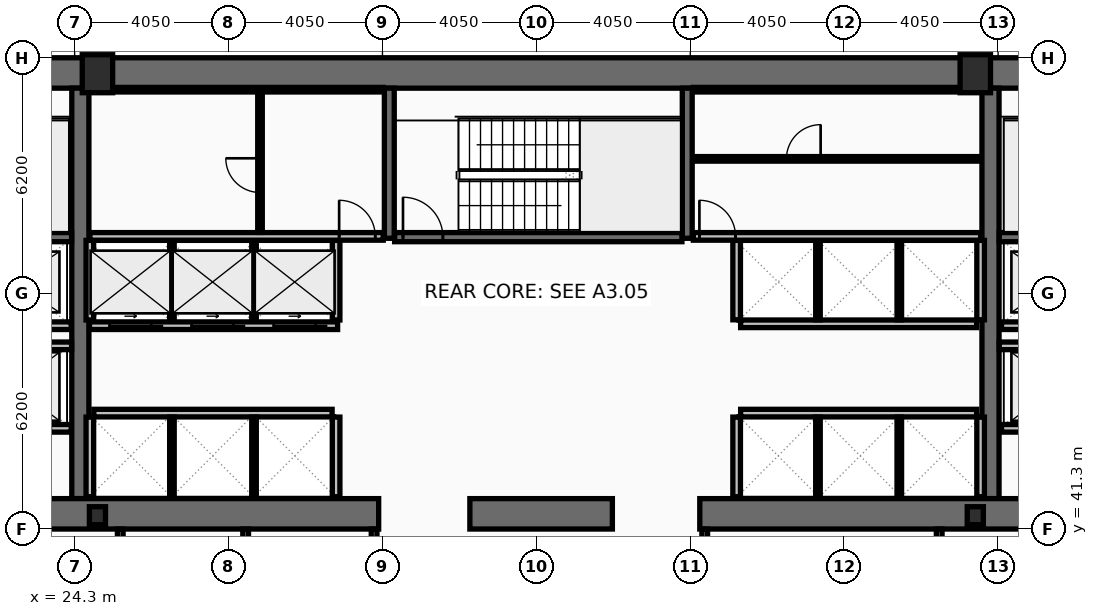
"""IFC4 building model, lengths in metres.
Left out: names, types, materials, properties, quantities, classifications, styles, units other than length and angle.
Written with IfcOpenShell. Run it as: python <this file> out.ifc"""

import sys

from ifc_helpers import new_model, si_unit, direction, frame, frame_2d, origin, origin_2d, place, context, subcontext, project, spatial, rectangle, hollow_rectangle, i_section, extrude, element, fill, save


model = new_model("IFC4")
c1 = context("Model", 3, precision=1e-05, world=origin(), true_north=direction((0.0, 1.0)))
c2 = subcontext(c1, "Body", "Model", "MODEL_VIEW")
j1 = project(units=[si_unit("LENGTHUNIT", "METRE"), si_unit("PLANEANGLEUNIT", "RADIAN")], contexts=[c1])
p1 = place(None, origin())
s1 = spatial("IfcSite", under=j1, at=p1, CompositionType="ELEMENT")
p2 = place(p1, origin())
s2 = spatial("IfcBuilding", under=s1, at=p2, CompositionType="ELEMENT")
p3 = place(p2, frame((0.0, 0.0, 53.8)))
s3 = spatial("IfcBuildingStorey", under=s2, at=p3, CompositionType="ELEMENT", Elevation=53.8)
p4 = place(p3, frame((16.2, 53.3, 0.0), z_axis=(0.0, 0.0, 1.0), x_axis=(1.0, 0.0, 0.0)))
e1 = element("IfcWall", 1, at=p4, inside=s3, PredefinedType="SHEAR", context=c2, shape_type="SweptSolid", body=[
    extrude(rectangle(XDim=40.5, YDim=0.8, at=frame_2d((20.25, 0.0))), origin(), (0.0, 0.0, 1.0), 3.82),
])
for number, where, z_axis, x_axis in (
    (2, (24.45, 42.1, 0.0), (0.0, 0.0, 1.0), (0.0, 1.0, 0.0)),
    (3, (48.4, 42.1, 0.0), (0.0, 0.0, 1.0), (0.0, 1.0, 0.0)),
):
    element("IfcWall", number, at=place(p3, frame(where, z_axis=z_axis, x_axis=x_axis)), inside=s3, PredefinedType="SHEAR", context=c2, shape_type="SweptSolid", body=[
        extrude(rectangle(XDim=10.8, YDim=0.45, at=frame_2d((5.4, 0.0))), origin(), (0.0, 0.0, 1.0), 3.82),
    ])
p5 = place(p3, frame((32.3, 41.7, 0.0), z_axis=(0.0, 0.0, 1.0), x_axis=(-1.0, 0.0, 0.0)))
e4 = element("IfcWall", 4, at=p5, inside=s3, PredefinedType="SHEAR", context=c2, shape_type="SweptSolid", body=[
    extrude(rectangle(XDim=11.45, YDim=0.8, at=frame_2d((5.725, 0.0))), origin(), (0.0, 0.0, 1.0), 3.82),
])
p6 = place(p3, frame((38.45, 41.7, 0.0), z_axis=(0.0, 0.0, 1.0), x_axis=(-1.0, 0.0, 0.0)))
e5 = element("IfcWall", 5, at=p6, inside=s3, PredefinedType="SHEAR", context=c2, shape_type="SweptSolid", body=[
    extrude(rectangle(XDim=3.75, YDim=0.8, at=frame_2d((1.875, 0.0))), origin(), (0.0, 0.0, 1.0), 3.82),
])
p7 = place(p3, frame((52.05, 41.7, 0.0), z_axis=(0.0, 0.0, 1.0), x_axis=(-1.0, 0.0, 0.0)))
e6 = element("IfcWall", 6, at=p7, inside=s3, PredefinedType="SHEAR", context=c2, shape_type="SweptSolid", body=[
    extrude(rectangle(XDim=11.3, YDim=0.8, at=frame_2d((5.65, 0.0))), origin(), (0.0, 0.0, 1.0), 3.82),
])
for number, where, z_axis, x_axis in (
    (7, (32.58, 48.95, 0.0), (0.0, 0.0, 1.0), (0.0, 1.0, 0.0)),
    (8, (40.42, 48.95, 0.0), (0.0, 0.0, 1.0), (0.0, 1.0, 0.0)),
):
    element("IfcWall", number, at=place(p3, frame(where, z_axis=z_axis, x_axis=x_axis)), inside=s3, PredefinedType="SHEAR", context=c2, shape_type="SweptSolid", body=[
        extrude(rectangle(XDim=3.95, YDim=0.26, at=frame_2d((1.975, 0.0))), origin(), (0.0, 0.0, 1.0), 3.82),
    ])
p8 = place(p3, frame((17.0, 48.98, 0.0), z_axis=(0.0, 0.0, 1.0), x_axis=(1.0, 0.0, 0.0)))
e9 = element("IfcWall", 9, at=p8, inside=s3, PredefinedType="SHEAR", context=c2, shape_type="SweptSolid", body=[
    extrude(rectangle(XDim=7.22, YDim=0.24, at=frame_2d((3.61, 0.0))), origin(), (0.0, 0.0, 1.0), 3.82),
])
p9 = place(p8, frame((0.22, 0.0, 0.0)))
e10 = element("IfcOpeningElement", 10, at=p9, cuts=e9, PredefinedType="OPENING", context=c2, shape_type="SweptSolid", body=[
    extrude(rectangle(XDim=1.05, YDim=2.15, at=frame_2d((0.525, 1.075))), frame((0.0, 0.13, 0.0), z_axis=(0.0, -1.0, 0.0), x_axis=(1.0, 0.0, 0.0)), (0.0, 0.0, 1.0), 0.26),
])
p10 = place(p3, frame((48.63, 48.98, 0.0), z_axis=(0.0, 0.0, 1.0), x_axis=(1.0, 0.0, 0.0)))
e11 = element("IfcWall", 11, at=p10, inside=s3, PredefinedType="SHEAR", context=c2, shape_type="SweptSolid", body=[
    extrude(rectangle(XDim=7.27, YDim=0.24, at=frame_2d((3.635, 0.0))), origin(), (0.0, 0.0, 1.0), 3.82),
])
p11 = place(p10, frame((6.0, 0.0, 0.0)))
e12 = element("IfcOpeningElement", 12, at=p11, cuts=e11, PredefinedType="OPENING", context=c2, shape_type="SweptSolid", body=[
    extrude(rectangle(XDim=1.05, YDim=2.15, at=frame_2d((0.525, 1.075))), frame((0.0, 0.13, 0.0), z_axis=(0.0, -1.0, 0.0), x_axis=(1.0, 0.0, 0.0)), (0.0, 0.0, 1.0), 0.26),
])
p12 = place(p3, frame((32.72, 48.98, 0.0), z_axis=(0.0, 0.0, 1.0), x_axis=(1.0, 0.0, 0.0)))
e13 = element("IfcWall", 13, at=p12, inside=s3, PredefinedType="SHEAR", context=c2, shape_type="SweptSolid", body=[
    extrude(rectangle(XDim=7.56, YDim=0.24, at=frame_2d((3.78, 0.0))), origin(), (0.0, 0.0, 1.0), 3.82),
])
p13 = place(p12, frame((0.22, 0.0, 0.0)))
e14 = element("IfcOpeningElement", 14, at=p13, cuts=e13, PredefinedType="OPENING", context=c2, shape_type="SweptSolid", body=[
    extrude(rectangle(XDim=1.05, YDim=2.15, at=frame_2d((0.525, 1.075))), frame((0.0, 0.13, 0.0), z_axis=(0.0, -1.0, 0.0), x_axis=(1.0, 0.0, 0.0)), (0.0, 0.0, 1.0), 0.26),
])
for number, where, z_axis, x_axis in (
    (15, (24.9, 53.28, 0.0), (0.0, 0.0, 1.0), (1.0, 0.0, 0.0)),
    (16, (48.0, 53.28, 0.0), (0.0, 0.0, 1.0), (1.0, 0.0, 0.0)),
):
    element("IfcColumn", number, at=place(p3, frame(where, z_axis=z_axis, x_axis=x_axis)), inside=s3, PredefinedType="COLUMN", context=c2, shape_type="SweptSolid", body=[
        extrude(hollow_rectangle(XDim=0.8, YDim=1.0, WallThickness=0.055, at=origin_2d()), origin(), (0.0, 0.0, 1.0), 4.0),
    ])
for number, where, z_axis, x_axis in (
    (17, (24.9, 41.65, 0.0), (0.0, 0.0, 1.0), (1.0, 0.0, 0.0)),
    (18, (48.0, 41.65, 0.0), (0.0, 0.0, 1.0), (1.0, 0.0, 0.0)),
):
    element("IfcColumn", number, at=place(p3, frame(where, z_axis=z_axis, x_axis=x_axis)), inside=s3, PredefinedType="COLUMN", context=c2, shape_type="SweptSolid", body=[
        extrude(i_section(OverallWidth=0.424, OverallDepth=0.474, WebThickness=0.048, FlangeThickness=0.077, at=origin_2d()), origin(), (0.0, 0.0, 1.0), 4.0),
    ])
p14 = place(p3, frame((51.61, 43.95, 0.0), z_axis=(0.0, 0.0, 1.0), x_axis=(-1.0, 0.0, 0.0)))
e19 = element("IfcWall", 19, at=p14, inside=s3, PredefinedType="PARTITIONING", context=c2, shape_type="SweptSolid", body=[
    extrude(rectangle(XDim=2.92, YDim=0.2, at=frame_2d((1.46, 0.0))), origin(), (0.0, 0.0, 1.0), 3.82),
])
p15 = place(p14, frame((0.81, 0.0, 0.0)))
e20 = element("IfcOpeningElement", 20, at=p15, cuts=e19, PredefinedType="OPENING", context=c2, shape_type="SweptSolid", body=[
    extrude(rectangle(XDim=1.3, YDim=2.18, at=frame_2d((0.65, 1.09))), frame((0.0, 0.11, 0.0), z_axis=(0.0, -1.0, 0.0), x_axis=(1.0, 0.0, 0.0)), (0.0, 0.0, 1.0), 0.22),
])
p16 = place(p3, frame((24.21, 43.95, 0.0), z_axis=(0.0, 0.0, 1.0), x_axis=(-1.0, 0.0, 0.0)))
e21 = element("IfcWall", 21, at=p16, inside=s3, PredefinedType="PARTITIONING", context=c2, shape_type="SweptSolid", body=[
    extrude(rectangle(XDim=2.97, YDim=0.2, at=frame_2d((1.485, 0.0))), origin(), (0.0, 0.0, 1.0), 3.82),
])
p17 = place(p16, frame((0.86, 0.0, 0.0)))
e22 = element("IfcOpeningElement", 22, at=p17, cuts=e21, PredefinedType="OPENING", context=c2, shape_type="SweptSolid", body=[
    extrude(rectangle(XDim=1.3, YDim=2.18, at=frame_2d((0.65, 1.09))), frame((0.0, 0.11, 0.0), z_axis=(0.0, -1.0, 0.0), x_axis=(1.0, 0.0, 0.0)), (0.0, 0.0, 1.0), 0.22),
])
p18 = place(p3, frame((51.61, 46.65, 0.0), z_axis=(0.0, 0.0, 1.0), x_axis=(-1.0, 0.0, 0.0)))
e23 = element("IfcWall", 23, at=p18, inside=s3, PredefinedType="PARTITIONING", context=c2, shape_type="SweptSolid", body=[
    extrude(rectangle(XDim=2.92, YDim=0.2, at=frame_2d((1.46, 0.0))), origin(), (0.0, 0.0, 1.0), 3.82),
])
p19 = place(p18, frame((0.86, 0.0, 0.0)))
e24 = element("IfcOpeningElement", 24, at=p19, cuts=e23, PredefinedType="OPENING", context=c2, shape_type="SweptSolid", body=[
    extrude(rectangle(XDim=1.2, YDim=2.18, at=frame_2d((0.6, 1.09))), frame((0.0, 0.11, 0.0), z_axis=(0.0, -1.0, 0.0), x_axis=(1.0, 0.0, 0.0)), (0.0, 0.0, 1.0), 0.22),
])
p20 = place(p3, frame((24.21, 46.65, 0.0), z_axis=(0.0, 0.0, 1.0), x_axis=(-1.0, 0.0, 0.0)))
e25 = element("IfcWall", 25, at=p20, inside=s3, PredefinedType="PARTITIONING", context=c2, shape_type="SweptSolid", body=[
    extrude(rectangle(XDim=2.97, YDim=0.2, at=frame_2d((1.485, 0.0))), origin(), (0.0, 0.0, 1.0), 3.82),
])
p21 = place(p20, frame((0.91, 0.0, 0.0)))
e26 = element("IfcOpeningElement", 26, at=p21, cuts=e25, PredefinedType="OPENING", context=c2, shape_type="SweptSolid", body=[
    extrude(rectangle(XDim=1.2, YDim=2.18, at=frame_2d((0.6, 1.09))), frame((0.0, 0.11, 0.0), z_axis=(0.0, -1.0, 0.0), x_axis=(1.0, 0.0, 0.0)), (0.0, 0.0, 1.0), 0.22),
])
p22 = place(p3, frame((31.22, 46.65, 0.0), z_axis=(0.0, 0.0, 1.0), x_axis=(-1.0, 0.0, 0.0)))
e27 = element("IfcWall", 27, at=p22, inside=s3, PredefinedType="PARTITIONING", context=c2, shape_type="SweptSolid", body=[
    extrude(rectangle(XDim=6.53, YDim=0.2, at=frame_2d((3.265, 0.0))), origin(), (0.0, 0.0, 1.0), 3.82),
])
p23 = place(p22, frame((4.9, 0.0, 0.0)))
e28 = element("IfcOpeningElement", 28, at=p23, cuts=e27, PredefinedType="OPENING", context=c2, shape_type="SweptSolid", body=[
    extrude(rectangle(XDim=1.1, YDim=2.18, at=frame_2d((0.55, 1.09))), frame((0.0, 0.11, 0.0), z_axis=(0.0, -1.0, 0.0), x_axis=(1.0, 0.0, 0.0)), (0.0, 0.0, 1.0), 0.22),
])
p24 = place(p22, frame((2.74, 0.0, 0.0)))
e29 = element("IfcOpeningElement", 29, at=p24, cuts=e27, PredefinedType="OPENING", context=c2, shape_type="SweptSolid", body=[
    extrude(rectangle(XDim=1.1, YDim=2.18, at=frame_2d((0.55, 1.09))), frame((0.0, 0.11, 0.0), z_axis=(0.0, -1.0, 0.0), x_axis=(1.0, 0.0, 0.0)), (0.0, 0.0, 1.0), 0.22),
])
p25 = place(p22, frame((0.58, 0.0, 0.0)))
e30 = element("IfcOpeningElement", 30, at=p25, cuts=e27, PredefinedType="OPENING", context=c2, shape_type="SweptSolid", body=[
    extrude(rectangle(XDim=1.1, YDim=2.18, at=frame_2d((0.55, 1.09))), frame((0.0, 0.11, 0.0), z_axis=(0.0, -1.0, 0.0), x_axis=(1.0, 0.0, 0.0)), (0.0, 0.0, 1.0), 0.22),
])
p26 = place(p3, frame((21.2, 46.12, 0.0), z_axis=(0.0, 0.0, 1.0), x_axis=(1.0, 0.0, 0.0)))
e31 = element("IfcWall", 31, at=p26, inside=s3, PredefinedType="PARTITIONING", context=c2, shape_type="SweptSolid", body=[
    extrude(rectangle(XDim=3.02, YDim=0.2, at=frame_2d((1.51, 0.0))), origin(), (0.0, 0.0, 1.0), 3.82),
])
p27 = place(p3, frame((48.63, 46.12, 0.0), z_axis=(0.0, 0.0, 1.0), x_axis=(1.0, 0.0, 0.0)))
e32 = element("IfcWall", 32, at=p27, inside=s3, PredefinedType="PARTITIONING", context=c2, shape_type="SweptSolid", body=[
    extrude(rectangle(XDim=3.07, YDim=0.2, at=frame_2d((1.535, 0.0))), origin(), (0.0, 0.0, 1.0), 3.82),
])
for number, where, z_axis, x_axis in (
    (33, (24.7, 46.8, 0.0), (0.0, 0.0, 1.0), (0.0, 1.0, 0.0)),
    (34, (31.18, 46.8, 0.0), (0.0, 0.0, 1.0), (0.0, 1.0, 0.0)),
):
    element("IfcWall", number, at=place(p3, frame(where, z_axis=z_axis, x_axis=x_axis)), inside=s3, PredefinedType="PARTITIONING", context=c2, shape_type="SweptSolid", body=[
        extrude(rectangle(XDim=2.095, YDim=0.2, at=frame_2d((1.047, 0.0))), origin(), (0.0, 0.0, 1.0), 3.82),
    ])
for number, where, z_axis, x_axis in (
    (35, (26.86, 46.8, 0.0), (0.0, 0.0, 1.0), (0.0, 1.0, 0.0)),
    (36, (29.02, 46.8, 0.0), (0.0, 0.0, 1.0), (0.0, 1.0, 0.0)),
):
    element("IfcWall", number, at=place(p3, frame(where, z_axis=z_axis, x_axis=x_axis)), inside=s3, PredefinedType="PARTITIONING", context=c2, shape_type="SweptSolid", body=[
        extrude(rectangle(XDim=2.095, YDim=0.12, at=frame_2d((1.047, 0.0))), origin(), (0.0, 0.0, 1.0), 3.82),
    ])
p28 = place(p3, frame((24.805, 44.35, 0.0), z_axis=(0.0, 0.0, 1.0), x_axis=(1.0, 0.0, 0.0)))
e37 = element("IfcWall", 37, at=p28, inside=s3, PredefinedType="PARTITIONING", context=c2, shape_type="SweptSolid", body=[
    extrude(rectangle(XDim=6.27, YDim=0.2, at=frame_2d((3.135, 0.0))), origin(), (0.0, 0.0, 1.0), 3.82),
])
for number, where, z_axis, x_axis in (
    (38, (24.7, 42.15, 0.0), (0.0, 0.0, 1.0), (0.0, 1.0, 0.0)),
    (39, (31.18, 42.15, 0.0), (0.0, 0.0, 1.0), (0.0, 1.0, 0.0)),
):
    element("IfcWall", number, at=place(p3, frame(where, z_axis=z_axis, x_axis=x_axis)), inside=s3, PredefinedType="PARTITIONING", context=c2, shape_type="SweptSolid", body=[
        extrude(rectangle(XDim=2.095, YDim=0.2, at=frame_2d((1.048, 0.0))), origin(), (0.0, 0.0, 1.0), 3.82),
    ])
for number, where, z_axis, x_axis in (
    (40, (26.86, 42.15, 0.0), (0.0, 0.0, 1.0), (0.0, 1.0, 0.0)),
    (41, (29.02, 42.15, 0.0), (0.0, 0.0, 1.0), (0.0, 1.0, 0.0)),
):
    element("IfcWall", number, at=place(p3, frame(where, z_axis=z_axis, x_axis=x_axis)), inside=s3, PredefinedType="PARTITIONING", context=c2, shape_type="SweptSolid", body=[
        extrude(rectangle(XDim=2.095, YDim=0.12, at=frame_2d((1.048, 0.0))), origin(), (0.0, 0.0, 1.0), 3.82),
    ])
p29 = place(p3, frame((41.825, 46.7, 0.0), z_axis=(0.0, 0.0, 1.0), x_axis=(1.0, 0.0, 0.0)))
e42 = element("IfcWall", 42, at=p29, inside=s3, PredefinedType="PARTITIONING", context=c2, shape_type="SweptSolid", body=[
    extrude(rectangle(XDim=6.21, YDim=0.2, at=frame_2d((3.105, 0.0))), origin(), (0.0, 0.0, 1.0), 3.82),
])
for number, where, z_axis, x_axis in (
    (43, (41.72, 46.805, 0.0), (0.0, 0.0, 1.0), (0.0, 1.0, 0.0)),
    (44, (48.14, 46.805, 0.0), (0.0, 0.0, 1.0), (0.0, 1.0, 0.0)),
):
    element("IfcWall", number, at=place(p3, frame(where, z_axis=z_axis, x_axis=x_axis)), inside=s3, PredefinedType="PARTITIONING", context=c2, shape_type="SweptSolid", body=[
        extrude(rectangle(XDim=2.09, YDim=0.2, at=frame_2d((1.045, 0.0))), origin(), (0.0, 0.0, 1.0), 3.82),
    ])
for number, where, z_axis, x_axis in (
    (45, (43.86, 46.805, 0.0), (0.0, 0.0, 1.0), (0.0, 1.0, 0.0)),
    (46, (46.0, 46.805, 0.0), (0.0, 0.0, 1.0), (0.0, 1.0, 0.0)),
):
    element("IfcWall", number, at=place(p3, frame(where, z_axis=z_axis, x_axis=x_axis)), inside=s3, PredefinedType="PARTITIONING", context=c2, shape_type="SweptSolid", body=[
        extrude(rectangle(XDim=2.09, YDim=0.12, at=frame_2d((1.045, 0.0))), origin(), (0.0, 0.0, 1.0), 3.82),
    ])
p30 = place(p3, frame((41.825, 44.35, 0.0), z_axis=(0.0, 0.0, 1.0), x_axis=(1.0, 0.0, 0.0)))
e47 = element("IfcWall", 47, at=p30, inside=s3, PredefinedType="PARTITIONING", context=c2, shape_type="SweptSolid", body=[
    extrude(rectangle(XDim=6.21, YDim=0.2, at=frame_2d((3.105, 0.0))), origin(), (0.0, 0.0, 1.0), 3.82),
])
for number, where, z_axis, x_axis in (
    (48, (41.72, 42.15, 0.0), (0.0, 0.0, 1.0), (0.0, 1.0, 0.0)),
    (49, (48.14, 42.15, 0.0), (0.0, 0.0, 1.0), (0.0, 1.0, 0.0)),
):
    element("IfcWall", number, at=place(p3, frame(where, z_axis=z_axis, x_axis=x_axis)), inside=s3, PredefinedType="PARTITIONING", context=c2, shape_type="SweptSolid", body=[
        extrude(rectangle(XDim=2.095, YDim=0.2, at=frame_2d((1.048, 0.0))), origin(), (0.0, 0.0, 1.0), 3.82),
    ])
for number, where, z_axis, x_axis in (
    (50, (43.86, 42.15, 0.0), (0.0, 0.0, 1.0), (0.0, 1.0, 0.0)),
    (51, (46.0, 42.15, 0.0), (0.0, 0.0, 1.0), (0.0, 1.0, 0.0)),
):
    element("IfcWall", number, at=place(p3, frame(where, z_axis=z_axis, x_axis=x_axis)), inside=s3, PredefinedType="PARTITIONING", context=c2, shape_type="SweptSolid", body=[
        extrude(rectangle(XDim=2.095, YDim=0.12, at=frame_2d((1.048, 0.0))), origin(), (0.0, 0.0, 1.0), 3.82),
    ])
p31 = place(p3, frame((24.7, 52.86, 0.0), z_axis=(0.0, 0.0, 1.0), x_axis=(1.0, 0.0, 0.0)))
e52 = element("IfcWall", 52, at=p31, inside=s3, PredefinedType="PARTITIONING", context=c2, shape_type="SweptSolid", body=[
    extrude(rectangle(XDim=7.72, YDim=0.12, at=frame_2d((3.86, 0.0))), origin(), (0.0, 0.0, 1.0), 3.82),
])
p32 = place(p3, frame((24.7, 49.0, 0.0), z_axis=(0.0, 0.0, 1.0), x_axis=(1.0, 0.0, 0.0)))
e53 = element("IfcWall", 53, at=p32, inside=s3, PredefinedType="PARTITIONING", context=c2, shape_type="SweptSolid", body=[
    extrude(rectangle(XDim=7.72, YDim=0.2, at=frame_2d((3.86, 0.0))), origin(), (0.0, 0.0, 1.0), 3.82),
])
p33 = place(p32, frame((6.56, 0.0, 0.0)))
e54 = element("IfcOpeningElement", 54, at=p33, cuts=e53, PredefinedType="OPENING", context=c2, shape_type="SweptSolid", body=[
    extrude(rectangle(XDim=0.95, YDim=2.1, at=frame_2d((0.475, 1.05))), frame((0.0, 0.11, 0.0), z_axis=(0.0, -1.0, 0.0), x_axis=(1.0, 0.0, 0.0)), (0.0, 0.0, 1.0), 0.22),
])
p34 = place(p3, frame((29.177, 49.105, 0.0), z_axis=(0.0, 0.0, 1.0), x_axis=(0.0, 1.0, 0.0)))
e55 = element("IfcWall", 55, at=p34, inside=s3, PredefinedType="PARTITIONING", context=c2, shape_type="SweptSolid", body=[
    extrude(rectangle(XDim=3.69, YDim=0.12, at=frame_2d((1.845, 0.0))), origin(), (0.0, 0.0, 1.0), 3.82),
])
p35 = place(p34, frame((1.05, 0.0, 0.0)))
e56 = element("IfcOpeningElement", 56, at=p35, cuts=e55, PredefinedType="OPENING", context=c2, shape_type="SweptSolid", body=[
    extrude(rectangle(XDim=0.9, YDim=2.05, at=frame_2d((0.45, 1.025))), frame((0.0, 0.07, 0.0), z_axis=(0.0, -1.0, 0.0), x_axis=(1.0, 0.0, 0.0)), (0.0, 0.0, 1.0), 0.14),
])
p36 = place(p3, frame((40.58, 52.86, 0.0), z_axis=(0.0, 0.0, 1.0), x_axis=(1.0, 0.0, 0.0)))
e57 = element("IfcWall", 57, at=p36, inside=s3, PredefinedType="PARTITIONING", context=c2, shape_type="SweptSolid", body=[
    extrude(rectangle(XDim=7.56, YDim=0.12, at=frame_2d((3.78, 0.0))), origin(), (0.0, 0.0, 1.0), 3.82),
])
p37 = place(p3, frame((40.58, 49.0, 0.0), z_axis=(0.0, 0.0, 1.0), x_axis=(1.0, 0.0, 0.0)))
e58 = element("IfcWall", 58, at=p37, inside=s3, PredefinedType="PARTITIONING", context=c2, shape_type="SweptSolid", body=[
    extrude(rectangle(XDim=7.56, YDim=0.2, at=frame_2d((3.78, 0.0))), origin(), (0.0, 0.0, 1.0), 3.82),
])
p38 = place(p37, frame((0.16, 0.0, 0.0)))
e59 = element("IfcOpeningElement", 59, at=p38, cuts=e58, PredefinedType="OPENING", context=c2, shape_type="SweptSolid", body=[
    extrude(rectangle(XDim=0.95, YDim=2.1, at=frame_2d((0.475, 1.05))), frame((0.0, 0.11, 0.0), z_axis=(0.0, -1.0, 0.0), x_axis=(1.0, 0.0, 0.0)), (0.0, 0.0, 1.0), 0.22),
])
p39 = place(p3, frame((40.63, 51.04, 0.0), z_axis=(0.0, 0.0, 1.0), x_axis=(1.0, 0.0, 0.0)))
e60 = element("IfcWall", 60, at=p39, inside=s3, PredefinedType="PARTITIONING", context=c2, shape_type="SweptSolid", body=[
    extrude(rectangle(XDim=7.46, YDim=0.12, at=frame_2d((3.73, 0.0))), origin(), (0.0, 0.0, 1.0), 3.82),
])
p40 = place(p39, frame((2.4, 0.0, 0.0)))
e61 = element("IfcOpeningElement", 61, at=p40, cuts=e60, PredefinedType="OPENING", context=c2, shape_type="SweptSolid", body=[
    extrude(rectangle(XDim=0.9, YDim=2.05, at=frame_2d((0.45, 1.025))), frame((0.0, 0.07, 0.0), z_axis=(0.0, -1.0, 0.0), x_axis=(1.0, 0.0, 0.0)), (0.0, 0.0, 1.0), 0.14),
])
for number, where, z_axis, x_axis in (
    (62, (25.5, 38.28, 0.0), (0.0, 0.0, 1.0), (0.0, 1.0, 0.0)),
    (63, (28.8, 38.28, 0.0), (0.0, 0.0, 1.0), (0.0, 1.0, 0.0)),
    (64, (32.18, 38.28, 0.0), (0.0, 0.0, 1.0), (0.0, 1.0, 0.0)),
    (65, (40.88, 38.28, 0.0), (0.0, 0.0, 1.0), (0.0, 1.0, 0.0)),
    (66, (47.05, 38.28, 0.0), (0.0, 0.0, 1.0), (0.0, 1.0, 0.0)),
):
    element("IfcWall", number, at=place(p3, frame(where, z_axis=z_axis, x_axis=x_axis)), inside=s3, PredefinedType="PARTITIONING", context=c2, shape_type="SweptSolid", body=[
        extrude(rectangle(XDim=3.02, YDim=0.15, at=frame_2d((1.51, 0.0))), origin(), (0.0, 0.0, 1.0), 3.82),
    ])
p41 = place(p13, origin())
e67 = element("IfcDoor", 67, at=p41, inside=s3, OperationType="SINGLE_SWING_LEFT", PredefinedType="DOOR", context=c2, shape_type="SweptSolid", body=[
    extrude(rectangle(XDim=1.05, YDim=2.15, at=frame_2d((0.525, 1.075))), frame((0.0, 0.025, 0.0), z_axis=(0.0, -1.0, 0.0), x_axis=(1.0, 0.0, 0.0)), (0.0, 0.0, 1.0), 0.05),
])
fill(e14, e67)
p42 = place(p23, origin())
e68 = element("IfcDoor", 68, at=p42, inside=s3, OperationType="SLIDING_TO_LEFT", PredefinedType="DOOR", context=c2, shape_type="SweptSolid", body=[
    extrude(rectangle(XDim=1.1, YDim=2.18, at=frame_2d((0.55, 1.09))), frame((0.0, 0.025, 0.0), z_axis=(0.0, -1.0, 0.0), x_axis=(1.0, 0.0, 0.0)), (0.0, 0.0, 1.0), 0.05),
])
fill(e28, e68)
p43 = place(p24, origin())
e69 = element("IfcDoor", 69, at=p43, inside=s3, OperationType="SLIDING_TO_LEFT", PredefinedType="DOOR", context=c2, shape_type="SweptSolid", body=[
    extrude(rectangle(XDim=1.1, YDim=2.18, at=frame_2d((0.55, 1.09))), frame((0.0, 0.025, 0.0), z_axis=(0.0, -1.0, 0.0), x_axis=(1.0, 0.0, 0.0)), (0.0, 0.0, 1.0), 0.05),
])
fill(e29, e69)
p44 = place(p25, origin())
e70 = element("IfcDoor", 70, at=p44, inside=s3, OperationType="SLIDING_TO_LEFT", PredefinedType="DOOR", context=c2, shape_type="SweptSolid", body=[
    extrude(rectangle(XDim=1.1, YDim=2.18, at=frame_2d((0.55, 1.09))), frame((0.0, 0.025, 0.0), z_axis=(0.0, -1.0, 0.0), x_axis=(1.0, 0.0, 0.0)), (0.0, 0.0, 1.0), 0.05),
])
fill(e30, e70)
p45 = place(p33, origin())
e71 = element("IfcDoor", 71, at=p45, inside=s3, OperationType="SINGLE_SWING_LEFT", PredefinedType="DOOR", context=c2, shape_type="SweptSolid", body=[
    extrude(rectangle(XDim=0.95, YDim=2.1, at=frame_2d((0.475, 1.05))), frame((0.0, 0.025, 0.0), z_axis=(0.0, -1.0, 0.0), x_axis=(1.0, 0.0, 0.0)), (0.0, 0.0, 1.0), 0.05),
])
fill(e54, e71)
p46 = place(p35, origin())
e72 = element("IfcDoor", 72, at=p46, inside=s3, OperationType="SINGLE_SWING_RIGHT", PredefinedType="DOOR", context=c2, shape_type="SweptSolid", body=[
    extrude(rectangle(XDim=0.9, YDim=2.05, at=frame_2d((0.45, 1.025))), frame((0.0, 0.025, 0.0), z_axis=(0.0, -1.0, 0.0), x_axis=(1.0, 0.0, 0.0)), (0.0, 0.0, 1.0), 0.05),
])
fill(e56, e72)
p47 = place(p38, origin())
e73 = element("IfcDoor", 73, at=p47, inside=s3, OperationType="SINGLE_SWING_LEFT", PredefinedType="DOOR", context=c2, shape_type="SweptSolid", body=[
    extrude(rectangle(XDim=0.95, YDim=2.1, at=frame_2d((0.475, 1.05))), frame((0.0, 0.025, 0.0), z_axis=(0.0, -1.0, 0.0), x_axis=(1.0, 0.0, 0.0)), (0.0, 0.0, 1.0), 0.05),
])
fill(e59, e73)
p48 = place(p40, origin())
e74 = element("IfcDoor", 74, at=p48, inside=s3, OperationType="SINGLE_SWING_RIGHT", PredefinedType="DOOR", context=c2, shape_type="SweptSolid", body=[
    extrude(rectangle(XDim=0.9, YDim=2.05, at=frame_2d((0.45, 1.025))), frame((0.0, 0.025, 0.0), z_axis=(0.0, -1.0, 0.0), x_axis=(1.0, 0.0, 0.0)), (0.0, 0.0, 1.0), 0.05),
])
fill(e61, e74)
save(model, sys.argv[1])
